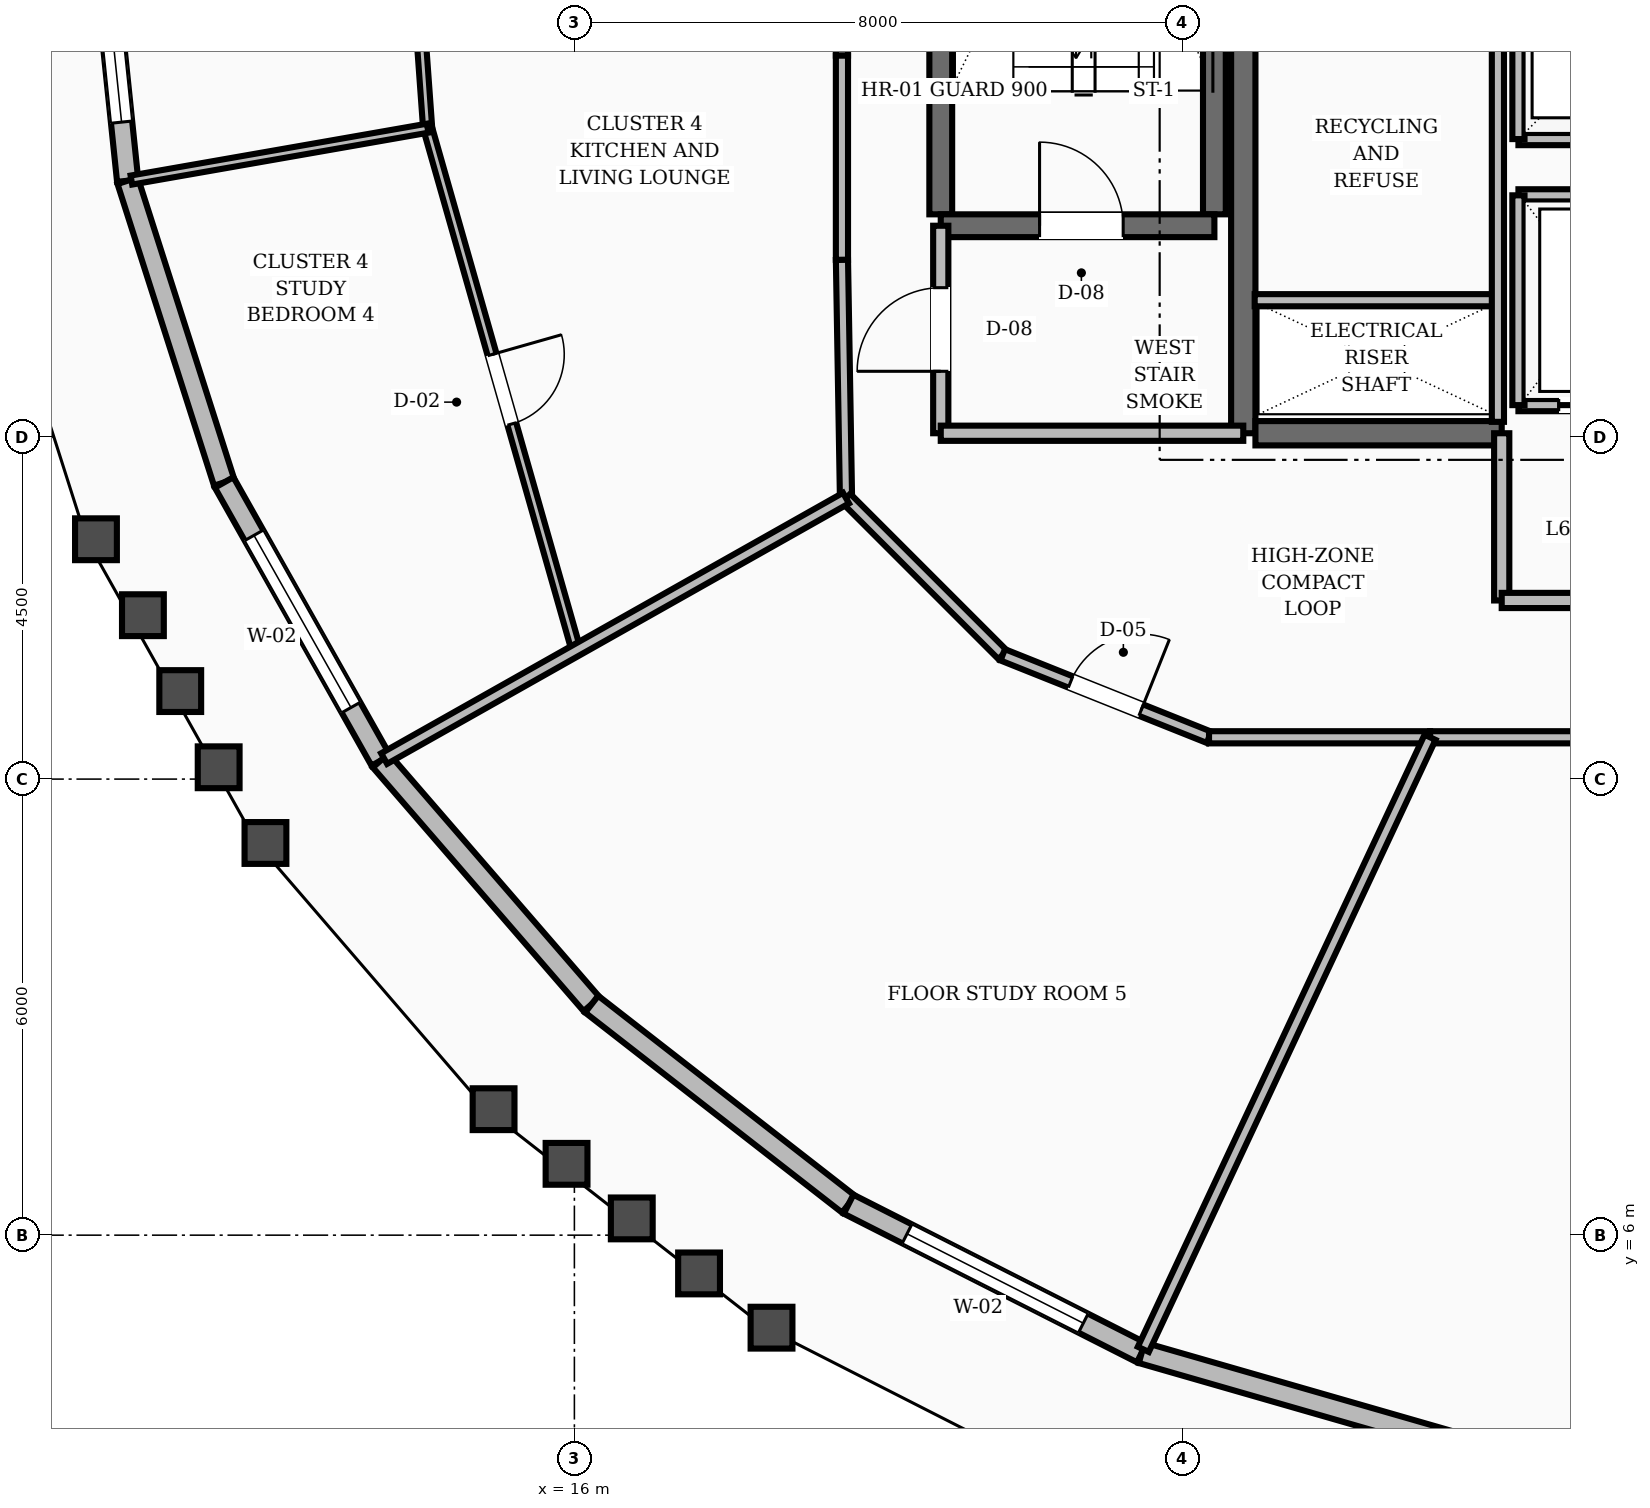
"""IFC4 building model, lengths in metres.
Left out: names, types, materials, properties, quantities, classifications, styles, units other than length and angle.
Written with IfcOpenShell. Run it as: python <this file> out.ifc"""

import sys

from ifc_helpers import new_model, si_unit, direction, frame, frame_2d, origin, place, context, subcontext, project, spatial, rectangle, extrude, element, fill, save


model = new_model("IFC4")
c1 = context("Model", 3, precision=1e-05, world=origin(), true_north=direction((0.0, 1.0)))
c2 = subcontext(c1, "Body", "Model", "MODEL_VIEW")
j1 = project(units=[si_unit("LENGTHUNIT", "METRE"), si_unit("PLANEANGLEUNIT", "RADIAN")], contexts=[c1])
p1 = place(None, origin())
s1 = spatial("IfcSite", under=j1, at=p1, CompositionType="ELEMENT")
p2 = place(p1, origin())
s2 = spatial("IfcBuilding", under=s1, at=p2, CompositionType="ELEMENT")
p3 = place(p2, frame((0.0, 0.0, 232.8)))
s3 = spatial("IfcBuildingStorey", under=s2, at=p3, CompositionType="ELEMENT", Elevation=232.8)
p4 = place(p3, frame((24.8, 16.55, 0.0), z_axis=(0.0, 0.0, 1.0), x_axis=(0.0, 1.0, 0.0)))
e1 = element("IfcWall", 1, at=p4, inside=s3, PredefinedType="SHEAR", context=c2, shape_type="SweptSolid", body=[
    extrude(rectangle(XDim=6.3, YDim=0.32, at=frame_2d((3.15, 0.0))), origin(), (0.0, 0.0, 1.0), 3.6),
])
p5 = place(p3, frame((24.96, 16.55, 0.0), z_axis=(0.0, 0.0, 1.0), x_axis=(1.0, 0.0, 0.0)))
e2 = element("IfcWall", 2, at=p5, inside=s3, PredefinedType="SHEAR", context=c2, shape_type="SweptSolid", body=[
    extrude(rectangle(XDim=3.24, YDim=0.32, at=frame_2d((1.62, 0.0))), origin(), (0.0, 0.0, 1.0), 3.6),
])
for number, where, z_axis, x_axis in (
    (3, (20.82, 19.43, 0.0), (0.0, 0.0, 1.0), (0.0, 1.0, 0.0)),
    (4, (24.42, 19.43, 0.0), (0.0, 0.0, 1.0), (0.0, 1.0, 0.0)),
):
    element("IfcWall", number, at=place(p3, frame(where, z_axis=z_axis, x_axis=x_axis)), inside=s3, PredefinedType="SHEAR", context=c2, shape_type="SweptSolid", body=[
        extrude(rectangle(XDim=8.74, YDim=0.3, at=frame_2d((4.37, 0.0))), origin(), (0.0, 0.0, 1.0), 3.6),
    ])
p6 = place(p3, frame((20.82, 19.28, 0.0), z_axis=(0.0, 0.0, 1.0), x_axis=(1.0, 0.0, 0.0)))
e5 = element("IfcWall", 5, at=p6, inside=s3, PredefinedType="SHEAR", context=c2, shape_type="SweptSolid", body=[
    extrude(rectangle(XDim=3.6, YDim=0.3, at=frame_2d((1.8, 0.0))), origin(), (0.0, 0.0, 1.0), 3.6),
])
p7 = place(p6, frame((1.3, 0.0, 0.0)))
e6 = element("IfcOpeningElement", 6, at=p7, cuts=e5, PredefinedType="OPENING", context=c2, shape_type="SweptSolid", body=[
    extrude(rectangle(XDim=1.1, YDim=2.1, at=frame_2d((0.55, 1.05))), frame((0.0, 0.16, 0.0), z_axis=(0.0, -1.0, 0.0), x_axis=(1.0, 0.0, 0.0)), (0.0, 0.0, 1.0), 0.32),
])
p8 = place(p3, frame((9.694, 24.0, 0.0), z_axis=(0.0, 0.0, 1.0), x_axis=(0.103306596515, -0.994649559954, 0.0)))
e7 = element("IfcWall", 7, at=p8, inside=s3, PredefinedType="STANDARD", context=c2, shape_type="SweptSolid", body=[
    extrude(rectangle(XDim=4.15, YDim=0.28, at=frame_2d((2.075, 0.0))), origin(), (0.0, 0.0, 1.0), 2.88),
])
p9 = place(p8, frame((0.775, 0.0, 0.8)))
e8 = element("IfcOpeningElement", 8, at=p9, cuts=e7, PredefinedType="OPENING", context=c2, shape_type="SweptSolid", body=[
    extrude(rectangle(XDim=2.6, YDim=1.65, at=frame_2d((1.3, 0.825))), frame((0.0, 0.15, 0.0), z_axis=(0.0, -1.0, 0.0), x_axis=(1.0, 0.0, 0.0)), (0.0, 0.0, 1.0), 0.3),
])
p10 = place(p3, frame((10.123, 19.872, 0.0), z_axis=(0.0, 0.0, 1.0), x_axis=(0.30458652957, -0.952484669695, 0.0)))
e9 = element("IfcWall", 9, at=p10, inside=s3, PredefinedType="STANDARD", context=c2, shape_type="SweptSolid", body=[
    extrude(rectangle(XDim=4.167, YDim=0.28, at=frame_2d((2.083, 0.0))), origin(), (0.0, 0.0, 1.0), 2.88),
])
p11 = place(p3, frame((11.392, 15.903, 0.0), z_axis=(0.0, 0.0, 1.0), x_axis=(0.490926410902, -0.871201044007, 0.0)))
e10 = element("IfcWall", 10, at=p11, inside=s3, PredefinedType="STANDARD", context=c2, shape_type="SweptSolid", body=[
    extrude(rectangle(XDim=4.199, YDim=0.28, at=frame_2d((2.099, 0.0))), origin(), (0.0, 0.0, 1.0), 2.88),
])
p12 = place(p11, frame((0.799, 0.0, 0.8)))
e11 = element("IfcOpeningElement", 11, at=p12, cuts=e10, PredefinedType="OPENING", context=c2, shape_type="SweptSolid", body=[
    extrude(rectangle(XDim=2.6, YDim=1.65, at=frame_2d((1.3, 0.825))), frame((0.0, 0.15, 0.0), z_axis=(0.0, -1.0, 0.0), x_axis=(1.0, 0.0, 0.0)), (0.0, 0.0, 1.0), 0.3),
])
p13 = place(p3, frame((13.453, 12.245, 0.0), z_axis=(0.0, 0.0, 1.0), x_axis=(0.654274793638, -0.756256897099, 0.0)))
e12 = element("IfcWall", 12, at=p13, inside=s3, PredefinedType="STANDARD", context=c2, shape_type="SweptSolid", body=[
    extrude(rectangle(XDim=4.24, YDim=0.28, at=frame_2d((2.12, 0.0))), origin(), (0.0, 0.0, 1.0), 2.88),
])
p14 = place(p3, frame((16.227, 9.039, 0.0), z_axis=(0.0, 0.0, 1.0), x_axis=(0.789112773216, -0.614248346475, 0.0)))
e13 = element("IfcWall", 13, at=p14, inside=s3, PredefinedType="STANDARD", context=c2, shape_type="SweptSolid", body=[
    extrude(rectangle(XDim=4.283, YDim=0.28, at=frame_2d((2.142, 0.0))), origin(), (0.0, 0.0, 1.0), 2.88),
])
p15 = place(p3, frame((19.607, 6.408, 0.0), z_axis=(0.0, 0.0, 1.0), x_axis=(0.891906133231, -0.452220576162, 0.0)))
e14 = element("IfcWall", 14, at=p15, inside=s3, PredefinedType="STANDARD", context=c2, shape_type="SweptSolid", body=[
    extrude(rectangle(XDim=4.324, YDim=0.28, at=frame_2d((2.162, 0.0))), origin(), (0.0, 0.0, 1.0), 2.88),
])
p16 = place(p15, frame((0.862, 0.0, 0.8)))
e15 = element("IfcOpeningElement", 15, at=p16, cuts=e14, PredefinedType="OPENING", context=c2, shape_type="SweptSolid", body=[
    extrude(rectangle(XDim=2.6, YDim=1.65, at=frame_2d((1.3, 0.825))), frame((0.0, 0.15, 0.0), z_axis=(0.0, -1.0, 0.0), x_axis=(1.0, 0.0, 0.0)), (0.0, 0.0, 1.0), 0.3),
])
p17 = place(p3, frame((23.464, 4.452, 0.0), z_axis=(0.0, 0.0, 1.0), x_axis=(0.961001713186, -0.276542414927, 0.0)))
e16 = element("IfcWall", 16, at=p17, inside=s3, PredefinedType="STANDARD", context=c2, shape_type="SweptSolid", body=[
    extrude(rectangle(XDim=4.354, YDim=0.28, at=frame_2d((2.177, 0.0))), origin(), (0.0, 0.0, 1.0), 2.88),
])
p18 = place(p3, frame((20.82, 16.55, 0.0), z_axis=(0.0, 0.0, 1.0), x_axis=(0.0, 1.0, 0.0)))
e17 = element("IfcWall", 17, at=p18, inside=s3, PredefinedType="SOLIDWALL", context=c2, shape_type="SweptSolid", body=[
    extrude(rectangle(XDim=2.73, YDim=0.2, at=frame_2d((1.365, 0.0))), origin(), (0.0, 0.0, 1.0), 2.87),
])
p19 = place(p18, frame((0.815, 0.0, 0.0)))
e18 = element("IfcOpeningElement", 18, at=p19, cuts=e17, PredefinedType="OPENING", context=c2, shape_type="SweptSolid", body=[
    extrude(rectangle(XDim=1.1, YDim=2.1, at=frame_2d((0.55, 1.05))), frame((0.0, 0.11, 0.0), z_axis=(0.0, -1.0, 0.0), x_axis=(1.0, 0.0, 0.0)), (0.0, 0.0, 1.0), 0.22),
])
p20 = place(p3, frame((20.82, 16.55, 0.0), z_axis=(0.0, 0.0, 1.0), x_axis=(1.0, 0.0, 0.0)))
e19 = element("IfcWall", 19, at=p20, inside=s3, PredefinedType="SOLIDWALL", context=c2, shape_type="SweptSolid", body=[
    extrude(rectangle(XDim=3.98, YDim=0.2, at=frame_2d((1.99, 0.0))), origin(), (0.0, 0.0, 1.0), 2.87),
])
p21 = place(p3, frame((28.2, 14.35, 0.0), z_axis=(0.0, 0.0, 1.0), x_axis=(0.0, 1.0, 0.0)))
e20 = element("IfcWall", 20, at=p21, inside=s3, PredefinedType="SOLIDWALL", context=c2, shape_type="SweptSolid", body=[
    extrude(rectangle(XDim=2.2, YDim=0.2, at=frame_2d((1.1, 0.0))), origin(), (0.0, 0.0, 1.0), 2.87),
])
p22 = place(p3, frame((28.2, 14.35, 0.0), z_axis=(0.0, 0.0, 1.0), x_axis=(1.0, 0.0, 0.0)))
e21 = element("IfcWall", 21, at=p22, inside=s3, PredefinedType="SOLIDWALL", context=c2, shape_type="SweptSolid", body=[
    extrude(rectangle(XDim=7.6, YDim=0.2, at=frame_2d((3.8, 0.0))), origin(), (0.0, 0.0, 1.0), 2.87),
])
p23 = place(p22, frame((3.2, 0.0, 0.0)))
e22 = element("IfcOpeningElement", 22, at=p23, cuts=e21, PredefinedType="OPENING", context=c2, shape_type="SweptSolid", body=[
    extrude(rectangle(XDim=1.2, YDim=2.1, at=frame_2d((0.6, 1.05))), frame((0.0, 0.11, 0.0), z_axis=(0.0, -1.0, 0.0), x_axis=(1.0, 0.0, 0.0)), (0.0, 0.0, 1.0), 0.22),
])
for number, where, z_axis, x_axis in (
    (23, (28.42, 20.42, 0.0), (0.0, 0.0, 1.0), (1.0, 0.0, 0.0)),
    (24, (28.42, 20.42, 0.0), (0.0, 0.0, 1.0), (0.0, 1.0, 0.0)),
):
    element("IfcWall", number, at=place(p3, frame(where, z_axis=z_axis, x_axis=x_axis)), inside=s3, PredefinedType="SOLIDWALL", context=c2, shape_type="SweptSolid", body=[
        extrude(rectangle(XDim=2.16, YDim=0.16, at=frame_2d((1.08, 0.0))), origin(), (0.0, 0.0, 1.0), 2.87),
    ])
p24 = place(p3, frame((28.42, 16.92, 0.0), z_axis=(0.0, 0.0, 1.0), x_axis=(1.0, 0.0, 0.0)))
e25 = element("IfcWall", 25, at=p24, inside=s3, PredefinedType="SOLIDWALL", context=c2, shape_type="SweptSolid", body=[
    extrude(rectangle(XDim=7.16, YDim=0.16, at=frame_2d((3.58, 0.0))), origin(), (0.0, 0.0, 1.0), 2.87),
])
p25 = place(p24, frame((0.53, 0.0, 0.0)))
e26 = element("IfcOpeningElement", 26, at=p25, cuts=e25, PredefinedType="OPENING", context=c2, shape_type="SweptSolid", body=[
    extrude(rectangle(XDim=1.1, YDim=2.15, at=frame_2d((0.55, 1.075))), frame((0.0, 0.09, 0.0), z_axis=(0.0, -1.0, 0.0), x_axis=(1.0, 0.0, 0.0)), (0.0, 0.0, 1.0), 0.18),
])
p26 = place(p24, frame((3.03, 0.0, 0.0)))
e27 = element("IfcOpeningElement", 27, at=p26, cuts=e25, PredefinedType="OPENING", context=c2, shape_type="SweptSolid", body=[
    extrude(rectangle(XDim=1.1, YDim=2.15, at=frame_2d((0.55, 1.075))), frame((0.0, 0.09, 0.0), z_axis=(0.0, -1.0, 0.0), x_axis=(1.0, 0.0, 0.0)), (0.0, 0.0, 1.0), 0.18),
])
p27 = place(p24, frame((5.53, 0.0, 0.0)))
e28 = element("IfcOpeningElement", 28, at=p27, cuts=e25, PredefinedType="OPENING", context=c2, shape_type="SweptSolid", body=[
    extrude(rectangle(XDim=1.1, YDim=2.15, at=frame_2d((0.55, 1.075))), frame((0.0, 0.09, 0.0), z_axis=(0.0, -1.0, 0.0), x_axis=(1.0, 0.0, 0.0)), (0.0, 0.0, 1.0), 0.18),
])
p28 = place(p3, frame((28.42, 19.68, 0.0), z_axis=(0.0, 0.0, 1.0), x_axis=(1.0, 0.0, 0.0)))
e29 = element("IfcWall", 29, at=p28, inside=s3, PredefinedType="SOLIDWALL", context=c2, shape_type="SweptSolid", body=[
    extrude(rectangle(XDim=7.16, YDim=0.16, at=frame_2d((3.58, 0.0))), origin(), (0.0, 0.0, 1.0), 2.87),
])
p29 = place(p3, frame((28.42, 16.92, 0.0), z_axis=(0.0, 0.0, 1.0), x_axis=(0.0, 1.0, 0.0)))
e30 = element("IfcWall", 30, at=p29, inside=s3, PredefinedType="SOLIDWALL", context=c2, shape_type="SweptSolid", body=[
    extrude(rectangle(XDim=2.76, YDim=0.16, at=frame_2d((1.38, 0.0))), origin(), (0.0, 0.0, 1.0), 2.87),
])
p30 = place(p3, frame((24.95, 18.3, 0.0), z_axis=(0.0, 0.0, 1.0), x_axis=(1.0, 0.0, 0.0)))
e31 = element("IfcWall", 31, at=p30, inside=s3, PredefinedType="SOLIDWALL", context=c2, shape_type="SweptSolid", body=[
    extrude(rectangle(XDim=3.2, YDim=0.16, at=frame_2d((1.6, 0.0))), origin(), (0.0, 0.0, 1.0), 2.87),
])
p31 = place(p3, frame((28.15, 16.7, 0.0), z_axis=(0.0, 0.0, 1.0), x_axis=(0.0, 1.0, 0.0)))
e32 = element("IfcWall", 32, at=p31, inside=s3, PredefinedType="SOLIDWALL", context=c2, shape_type="SweptSolid", body=[
    extrude(rectangle(XDim=6.05, YDim=0.16, at=frame_2d((3.025, 0.0))), origin(), (0.0, 0.0, 1.0), 2.87),
])
p32 = place(p3, frame((19.52, 24.0, 0.0), z_axis=(0.0, 0.0, 1.0), x_axis=(0.0, -1.0, 0.0)))
e33 = element("IfcWall", 33, at=p32, inside=s3, PredefinedType="SOLIDWALL", context=c2, shape_type="SweptSolid", body=[
    extrude(rectangle(XDim=2.482, YDim=0.16, at=frame_2d((1.241, 0.0))), origin(), (0.0, 0.0, 1.0), 2.87),
])
p33 = place(p3, frame((19.52, 21.518, 0.0), z_axis=(0.0, 0.0, 1.0), x_axis=(0.0, -1.0, 0.0)))
e34 = element("IfcWall", 34, at=p33, inside=s3, PredefinedType="SOLIDWALL", context=c2, shape_type="SweptSolid", body=[
    extrude(rectangle(XDim=2.687, YDim=0.16, at=frame_2d((1.344, 0.0))), origin(), (0.0, 0.0, 1.0), 2.87),
])
p34 = place(p3, frame((19.52, 18.831, 0.0), z_axis=(0.0, 0.0, 1.0), x_axis=(0.016981035134, -0.999855811828, 0.0)))
e35 = element("IfcWall", 35, at=p34, inside=s3, PredefinedType="SOLIDWALL", context=c2, shape_type="SweptSolid", body=[
    extrude(rectangle(XDim=3.134, YDim=0.16, at=frame_2d((1.567, 0.0))), origin(), (0.0, 0.0, 1.0), 2.87),
])
p35 = place(p3, frame((19.573, 15.697, 0.0), z_axis=(0.0, 0.0, 1.0), x_axis=(0.707106781187, -0.707106781187, 0.0)))
e36 = element("IfcWall", 36, at=p35, inside=s3, PredefinedType="SOLIDWALL", context=c2, shape_type="SweptSolid", body=[
    extrude(rectangle(XDim=2.916, YDim=0.16, at=frame_2d((1.458, 0.0))), origin(), (0.0, 0.0, 1.0), 2.87),
])
p36 = place(p3, frame((21.635, 13.635, 0.0), z_axis=(0.0, 0.0, 1.0), x_axis=(0.92856882165, -0.371160266542, 0.0)))
e37 = element("IfcWall", 37, at=p36, inside=s3, PredefinedType="SOLIDWALL", context=c2, shape_type="SweptSolid", body=[
    extrude(rectangle(XDim=2.923, YDim=0.16, at=frame_2d((1.461, 0.0))), origin(), (0.0, 0.0, 1.0), 2.87),
])
p37 = place(p36, frame((0.962, 0.0, 0.0)))
e38 = element("IfcOpeningElement", 38, at=p37, cuts=e37, PredefinedType="OPENING", context=c2, shape_type="SweptSolid", body=[
    extrude(rectangle(XDim=1.0, YDim=2.1, at=frame_2d((0.5, 1.05))), frame((0.0, 0.09, 0.0), z_axis=(0.0, -1.0, 0.0), x_axis=(1.0, 0.0, 0.0)), (0.0, 0.0, 1.0), 0.18),
])
p38 = place(p3, frame((24.349, 12.55, 0.0), z_axis=(0.0, 0.0, 1.0), x_axis=(1.0, 0.0, 0.0)))
e39 = element("IfcWall", 39, at=p38, inside=s3, PredefinedType="SOLIDWALL", context=c2, shape_type="SweptSolid", body=[
    extrude(rectangle(XDim=2.908, YDim=0.16, at=frame_2d((1.454, 0.0))), origin(), (0.0, 0.0, 1.0), 2.87),
])
p39 = place(p3, frame((27.257, 12.55, 0.0), z_axis=(0.0, 0.0, 1.0), x_axis=(1.0, 0.0, 0.0)))
e40 = element("IfcWall", 40, at=p39, inside=s3, PredefinedType="SOLIDWALL", context=c2, shape_type="SweptSolid", body=[
    extrude(rectangle(XDim=2.465, YDim=0.16, at=frame_2d((1.232, 0.0))), origin(), (0.0, 0.0, 1.0), 2.87),
])
p40 = place(p3, frame((13.821, 24.0, 0.0), z_axis=(0.0, 0.0, 1.0), x_axis=(0.072128186897, -0.99739537028, 0.0)))
e41 = element("IfcWall", 41, at=p40, inside=s3, PredefinedType="PARTITIONING", context=c2, shape_type="SweptSolid", body=[
    extrude(rectangle(XDim=3.446, YDim=0.12, at=frame_2d((1.723, 0.0))), origin(), (0.0, 0.0, 1.0), 2.87),
])
p41 = place(p40, frame((1.248, 0.0, 0.0)))
e42 = element("IfcOpeningElement", 42, at=p41, cuts=e41, PredefinedType="OPENING", context=c2, shape_type="SweptSolid", body=[
    extrude(rectangle(XDim=0.95, YDim=2.1, at=frame_2d((0.475, 1.05))), frame((0.0, 0.07, 0.0), z_axis=(0.0, -1.0, 0.0), x_axis=(1.0, 0.0, 0.0)), (0.0, 0.0, 1.0), 0.14),
])
p42 = place(p3, frame((14.07, 20.563, 0.0), z_axis=(0.0, 0.0, 1.0), x_axis=(0.273646270328, -0.961830400193, 0.0)))
e43 = element("IfcWall", 43, at=p42, inside=s3, PredefinedType="PARTITIONING", context=c2, shape_type="SweptSolid", body=[
    extrude(rectangle(XDim=7.141, YDim=0.12, at=frame_2d((3.57, 0.0))), origin(), (0.0, 0.0, 1.0), 2.87),
])
p43 = place(p42, frame((3.095, 0.0, 0.0)))
e44 = element("IfcOpeningElement", 44, at=p43, cuts=e43, PredefinedType="OPENING", context=c2, shape_type="SweptSolid", body=[
    extrude(rectangle(XDim=0.95, YDim=2.1, at=frame_2d((0.475, 1.05))), frame((0.0, 0.07, 0.0), z_axis=(0.0, -1.0, 0.0), x_axis=(1.0, 0.0, 0.0)), (0.0, 0.0, 1.0), 0.14),
])
p44 = place(p3, frame((14.07, 20.563, 0.0), z_axis=(0.0, 0.0, 1.0), x_axis=(-0.985016843907, -0.172458160782, 0.0)))
e45 = element("IfcWall", 45, at=p44, inside=s3, PredefinedType="PARTITIONING", context=c2, shape_type="SweptSolid", body=[
    extrude(rectangle(XDim=3.957, YDim=0.12, at=frame_2d((1.979, 0.0))), origin(), (0.0, 0.0, 1.0), 2.87),
])
p45 = place(p3, frame((19.573, 15.697, 0.0), z_axis=(0.0, 0.0, 1.0), x_axis=(-0.87102262413, -0.491242901479, 0.0)))
e46 = element("IfcWall", 46, at=p45, inside=s3, PredefinedType="SOLIDWALL", context=c2, shape_type="SweptSolid", body=[
    extrude(rectangle(XDim=6.976, YDim=0.16, at=frame_2d((3.488, 0.0))), origin(), (0.0, 0.0, 1.0), 2.87),
])
p46 = place(p3, frame((27.257, 12.55, 0.0), z_axis=(0.0, 0.0, 1.0), x_axis=(-0.424224240042, -0.905557173325, 0.0)))
e47 = element("IfcWall", 47, at=p46, inside=s3, PredefinedType="SOLIDWALL", context=c2, shape_type="SweptSolid", body=[
    extrude(rectangle(XDim=8.892, YDim=0.16, at=frame_2d((4.446, 0.0))), origin(), (0.0, 0.0, 1.0), 2.87),
])
p47 = place(p9, origin())
e48 = element("IfcWindow", 48, at=p47, inside=s3, PartitioningType="SINGLE_PANEL", PredefinedType="WINDOW", context=c2, shape_type="SweptSolid", body=[
    extrude(rectangle(XDim=2.6, YDim=1.65, at=frame_2d((1.3, 0.825))), frame((0.0, 0.03, 0.0), z_axis=(0.0, -1.0, 0.0), x_axis=(1.0, 0.0, 0.0)), (0.0, 0.0, 1.0), 0.06),
])
fill(e8, e48)
p48 = place(p12, origin())
e49 = element("IfcWindow", 49, at=p48, inside=s3, PartitioningType="SINGLE_PANEL", PredefinedType="WINDOW", context=c2, shape_type="SweptSolid", body=[
    extrude(rectangle(XDim=2.6, YDim=1.65, at=frame_2d((1.3, 0.825))), frame((0.0, 0.03, 0.0), z_axis=(0.0, -1.0, 0.0), x_axis=(1.0, 0.0, 0.0)), (0.0, 0.0, 1.0), 0.06),
])
fill(e11, e49)
p49 = place(p16, origin())
e50 = element("IfcWindow", 50, at=p49, inside=s3, PartitioningType="SINGLE_PANEL", PredefinedType="WINDOW", context=c2, shape_type="SweptSolid", body=[
    extrude(rectangle(XDim=2.6, YDim=1.65, at=frame_2d((1.3, 0.825))), frame((0.0, 0.03, 0.0), z_axis=(0.0, -1.0, 0.0), x_axis=(1.0, 0.0, 0.0)), (0.0, 0.0, 1.0), 0.06),
])
fill(e15, e50)
p50 = place(p7, origin())
e51 = element("IfcDoor", 51, at=p50, inside=s3, OperationType="SINGLE_SWING_LEFT", PredefinedType="DOOR", context=c2, shape_type="SweptSolid", body=[
    extrude(rectangle(XDim=1.1, YDim=2.1, at=frame_2d((0.55, 1.05))), frame((0.0, 0.025, 0.0), z_axis=(0.0, -1.0, 0.0), x_axis=(1.0, 0.0, 0.0)), (0.0, 0.0, 1.0), 0.05),
])
fill(e6, e51)
p51 = place(p19, origin())
e52 = element("IfcDoor", 52, at=p51, inside=s3, OperationType="SINGLE_SWING_LEFT", PredefinedType="DOOR", context=c2, shape_type="SweptSolid", body=[
    extrude(rectangle(XDim=1.1, YDim=2.1, at=frame_2d((0.55, 1.05))), frame((0.0, 0.025, 0.0), z_axis=(0.0, -1.0, 0.0), x_axis=(1.0, 0.0, 0.0)), (0.0, 0.0, 1.0), 0.05),
])
fill(e18, e52)
p52 = place(p25, origin())
e53 = element("IfcDoor", 53, at=p52, inside=s3, OperationType="SLIDING_TO_RIGHT", PredefinedType="DOOR", context=c2, shape_type="SweptSolid", body=[
    extrude(rectangle(XDim=1.1, YDim=2.15, at=frame_2d((0.55, 1.075))), frame((0.0, 0.025, 0.0), z_axis=(0.0, -1.0, 0.0), x_axis=(1.0, 0.0, 0.0)), (0.0, 0.0, 1.0), 0.05),
])
fill(e26, e53)
p53 = place(p43, origin())
e54 = element("IfcDoor", 54, at=p53, inside=s3, OperationType="SINGLE_SWING_LEFT", PredefinedType="DOOR", context=c2, shape_type="SweptSolid", body=[
    extrude(rectangle(XDim=0.95, YDim=2.1, at=frame_2d((0.475, 1.05))), frame((0.0, 0.025, 0.0), z_axis=(0.0, -1.0, 0.0), x_axis=(1.0, 0.0, 0.0)), (0.0, 0.0, 1.0), 0.05),
])
fill(e44, e54)
p54 = place(p37, origin())
e55 = element("IfcDoor", 55, at=p54, inside=s3, OperationType="SINGLE_SWING_RIGHT", PredefinedType="DOOR", context=c2, shape_type="SweptSolid", body=[
    extrude(rectangle(XDim=1.0, YDim=2.1, at=frame_2d((0.5, 1.05))), frame((0.0, 0.025, 0.0), z_axis=(0.0, -1.0, 0.0), x_axis=(1.0, 0.0, 0.0)), (0.0, 0.0, 1.0), 0.05),
])
fill(e38, e55)
save(model, sys.argv[1])
